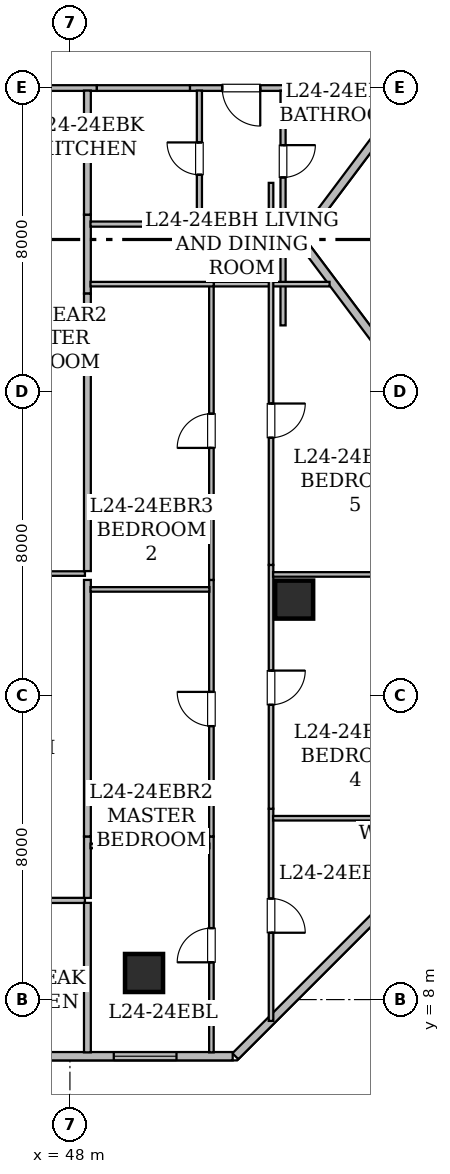
"""IFC4 building model, lengths in metres.
Left out: names, types, materials, properties, quantities, classifications, styles, units other than length and angle.
Written with IfcOpenShell. Run it as: python <this file> out.ifc"""

import sys

from ifc_helpers import new_model, si_unit, direction, frame, frame_2d, origin, origin_2d, place, context, subcontext, project, spatial, rectangle, hollow_rectangle, extrude, element, fill, save


model = new_model("IFC4")
c1 = context("Model", 3, precision=1e-05, world=origin(), true_north=direction((0.0, 1.0)))
c2 = subcontext(c1, "Body", "Model", "MODEL_VIEW")
j1 = project(units=[si_unit("LENGTHUNIT", "METRE"), si_unit("PLANEANGLEUNIT", "RADIAN")], contexts=[c1])
p1 = place(None, origin())
s1 = spatial("IfcSite", under=j1, at=p1, CompositionType="ELEMENT")
p2 = place(p1, origin())
s2 = spatial("IfcBuilding", under=s1, at=p2, CompositionType="ELEMENT")
p3 = place(p2, frame((0.0, 0.0, 98.25)))
s3 = spatial("IfcBuildingStorey", under=s2, at=p3, CompositionType="ELEMENT", Elevation=98.25)
for number, where, z_axis, x_axis in (
    (1, (49.95, 8.7, 0.0), (0.0, 0.0, 1.0), (1.0, 0.0, 0.0)),
    (2, (53.9, 18.525, 0.0), (0.0, 0.0, 1.0), (1.0, 0.0, 0.0)),
):
    element("IfcColumn", number, at=place(p3, frame(where, z_axis=z_axis, x_axis=x_axis)), inside=s3, PredefinedType="COLUMN", context=c2, shape_type="SweptSolid", body=[
        extrude(hollow_rectangle(XDim=1.0, YDim=1.0, WallThickness=0.05, at=origin_2d()), origin(), (0.0, 0.0, 1.0), 3.65),
    ])
p4 = place(p3, frame((56.456, 31.191, 0.0), z_axis=(0.0, 0.0, 1.0), x_axis=(-0.600137081448, -0.799897170561, 0.0)))
e3 = element("IfcWall", 3, at=p4, inside=s3, PredefinedType="STANDARD", context=c2, shape_type="SweptSolid", body=[
    extrude(rectangle(XDim=3.989, YDim=0.22, at=frame_2d((1.995, 0.0))), origin(), (0.0, 0.0, 1.0), 3.43),
])
p5 = place(p3, frame((54.119, 27.924, 0.0), z_axis=(0.0, 0.0, 1.0), x_axis=(0.600039540588, -0.799970343032, 0.0)))
e4 = element("IfcWall", 4, at=p5, inside=s3, PredefinedType="STANDARD", context=c2, shape_type="SweptSolid", body=[
    extrude(rectangle(XDim=3.952, YDim=0.22, at=frame_2d((1.976, 0.0))), origin(), (0.0, 0.0, 1.0), 3.43),
])
p6 = place(p3, frame((56.44, 10.596, 0.0), z_axis=(0.0, 0.0, 1.0), x_axis=(-0.707106781187, -0.707106781187, 0.0)))
e5 = element("IfcWall", 5, at=p6, inside=s3, PredefinedType="STANDARD", context=c2, shape_type="SweptSolid", body=[
    extrude(rectangle(XDim=5.778, YDim=0.22, at=frame_2d((2.889, 0.0))), origin(), (0.0, 0.0, 1.0), 3.43),
])
p7 = place(p3, frame((52.283, 6.51, 0.0), z_axis=(0.0, 0.0, 1.0), x_axis=(-1.0, 0.0, 0.0)))
e6 = element("IfcWall", 6, at=p7, inside=s3, PredefinedType="STANDARD", context=c2, shape_type="SweptSolid", body=[
    extrude(rectangle(XDim=38.568, YDim=0.22, at=frame_2d((19.284, 0.0))), origin(), (0.0, 0.0, 1.0), 3.43),
])
p8 = place(p7, frame((21.108, 0.0, 0.85)))
e7 = element("IfcOpeningElement", 7, at=p8, cuts=e6, PredefinedType="OPENING", context=c2, shape_type="SweptSolid", body=[
    extrude(rectangle(XDim=1.65, YDim=1.55, at=frame_2d((0.825, 0.775))), frame((0.0, 0.12, 0.0), z_axis=(0.0, -1.0, 0.0), x_axis=(1.0, 0.0, 0.0)), (0.0, 0.0, 1.0), 0.24),
])
p9 = place(p7, frame((35.355, 0.0, 0.85)))
e8 = element("IfcOpeningElement", 8, at=p9, cuts=e6, PredefinedType="OPENING", context=c2, shape_type="SweptSolid", body=[
    extrude(rectangle(XDim=1.65, YDim=1.55, at=frame_2d((0.825, 0.775))), frame((0.0, 0.12, 0.0), z_axis=(0.0, -1.0, 0.0), x_axis=(1.0, 0.0, 0.0)), (0.0, 0.0, 1.0), 0.24),
])
p10 = place(p7, frame((29.413, 0.0, 0.8)))
e9 = element("IfcOpeningElement", 9, at=p10, cuts=e6, PredefinedType="OPENING", context=c2, shape_type="SweptSolid", body=[
    extrude(rectangle(XDim=1.2, YDim=1.5, at=frame_2d((0.6, 0.75))), frame((0.0, 0.12, 0.0), z_axis=(0.0, -1.0, 0.0), x_axis=(1.0, 0.0, 0.0)), (0.0, 0.0, 1.0), 0.24),
])
p11 = place(p7, frame((31.863, 0.0, 0.85)))
e10 = element("IfcOpeningElement", 10, at=p11, cuts=e6, PredefinedType="OPENING", context=c2, shape_type="SweptSolid", body=[
    extrude(rectangle(XDim=1.65, YDim=1.55, at=frame_2d((0.825, 0.775))), frame((0.0, 0.12, 0.0), z_axis=(0.0, -1.0, 0.0), x_axis=(1.0, 0.0, 0.0)), (0.0, 0.0, 1.0), 0.24),
])
p12 = place(p7, frame((26.513, 0.0, 0.85)))
e11 = element("IfcOpeningElement", 11, at=p12, cuts=e6, PredefinedType="OPENING", context=c2, shape_type="SweptSolid", body=[
    extrude(rectangle(XDim=1.65, YDim=1.55, at=frame_2d((0.825, 0.775))), frame((0.0, 0.12, 0.0), z_axis=(0.0, -1.0, 0.0), x_axis=(1.0, 0.0, 0.0)), (0.0, 0.0, 1.0), 0.24),
])
p13 = place(p7, frame((13.843, 0.0, 0.85)))
e12 = element("IfcOpeningElement", 12, at=p13, cuts=e6, PredefinedType="OPENING", context=c2, shape_type="SweptSolid", body=[
    extrude(rectangle(XDim=1.65, YDim=1.55, at=frame_2d((0.825, 0.775))), frame((0.0, 0.12, 0.0), z_axis=(0.0, -1.0, 0.0), x_axis=(1.0, 0.0, 0.0)), (0.0, 0.0, 1.0), 0.24),
])
p14 = place(p7, frame((1.479, 0.0, 0.85)))
e13 = element("IfcOpeningElement", 13, at=p14, cuts=e6, PredefinedType="OPENING", context=c2, shape_type="SweptSolid", body=[
    extrude(rectangle(XDim=1.65, YDim=1.55, at=frame_2d((0.825, 0.775))), frame((0.0, 0.12, 0.0), z_axis=(0.0, -1.0, 0.0), x_axis=(1.0, 0.0, 0.0)), (0.0, 0.0, 1.0), 0.24),
])
p15 = place(p3, frame((48.709, 31.985, 0.0), z_axis=(0.0, 0.0, 1.0), x_axis=(-1.0, 0.0, 0.0)))
e14 = element("IfcWall", 14, at=p15, inside=s3, PredefinedType="STANDARD", context=c2, shape_type="SweptSolid", body=[
    extrude(rectangle(XDim=3.906, YDim=0.15, at=frame_2d((1.953, 0.0))), origin(), (0.0, 0.0, 1.0), 2.647),
])
p16 = place(p3, frame((53.857, 31.985, 0.0), z_axis=(0.0, 0.0, 1.0), x_axis=(-1.0, 0.0, 0.0)))
e15 = element("IfcWall", 15, at=p16, inside=s3, PredefinedType="STANDARD", context=c2, shape_type="SweptSolid", body=[
    extrude(rectangle(XDim=2.699, YDim=0.15, at=frame_2d((1.35, 0.0))), origin(), (0.0, 0.0, 1.0), 2.876),
])
p17 = place(p16, frame((0.849, 0.0, 0.0)))
e16 = element("IfcOpeningElement", 16, at=p17, cuts=e15, PredefinedType="OPENING", context=c2, shape_type="SweptSolid", body=[
    extrude(rectangle(XDim=1.0, YDim=2.15, at=frame_2d((0.5, 1.075))), frame((0.0, 0.085, 0.0), z_axis=(0.0, -1.0, 0.0), x_axis=(1.0, 0.0, 0.0)), (0.0, 0.0, 1.0), 0.17),
])
p18 = place(p3, frame((56.388, 31.985, 0.0), z_axis=(0.0, 0.0, 1.0), x_axis=(-1.0, 0.0, 0.0)))
e17 = element("IfcWall", 17, at=p18, inside=s3, PredefinedType="STANDARD", context=c2, shape_type="SweptSolid", body=[
    extrude(rectangle(XDim=2.531, YDim=0.15, at=frame_2d((1.266, 0.0))), origin(), (0.0, 0.0, 1.0), 2.876),
])
p19 = place(p3, frame((51.158, 31.985, 0.0), z_axis=(0.0, 0.0, 1.0), x_axis=(-1.0, 0.0, 0.0)))
e18 = element("IfcWall", 18, at=p19, inside=s3, PredefinedType="STANDARD", context=c2, shape_type="SweptSolid", body=[
    extrude(rectangle(XDim=2.449, YDim=0.15, at=frame_2d((1.225, 0.0))), origin(), (0.0, 0.0, 1.0), 3.43),
])
p20 = place(p3, frame((44.803, 19.21, 0.0), z_axis=(0.0, 0.0, 1.0), x_axis=(1.0, 0.0, 0.0)))
e19 = element("IfcWall", 19, at=p20, inside=s3, PredefinedType="PARTITIONING", context=c2, shape_type="SweptSolid", body=[
    extrude(rectangle(XDim=3.592, YDim=0.12, at=frame_2d((1.796, 0.0))), origin(), (0.0, 0.0, 1.0), 2.647),
])
p21 = place(p20, frame((0.397, 0.0, 0.0)))
e20 = element("IfcOpeningElement", 20, at=p21, cuts=e19, PredefinedType="OPENING", context=c2, shape_type="SweptSolid", body=[
    extrude(rectangle(XDim=0.9, YDim=2.1, at=frame_2d((0.45, 1.05))), frame((0.0, 0.07, 0.0), z_axis=(0.0, -1.0, 0.0), x_axis=(1.0, 0.0, 0.0)), (0.0, 0.0, 1.0), 0.14),
])
p22 = place(p3, frame((48.395, 10.61, 0.0), z_axis=(0.0, 0.0, 1.0), x_axis=(-1.0, 0.0, 0.0)))
e21 = element("IfcWall", 21, at=p22, inside=s3, PredefinedType="PARTITIONING", context=c2, shape_type="SweptSolid", body=[
    extrude(rectangle(XDim=4.166, YDim=0.135, at=frame_2d((2.083, 0.0))), origin(), (0.0, 0.0, 1.0), 3.43),
])
p23 = place(p22, frame((1.658, 0.0, 0.0)))
e22 = element("IfcOpeningElement", 22, at=p23, cuts=e21, PredefinedType="OPENING", context=c2, shape_type="SweptSolid", body=[
    extrude(rectangle(XDim=0.85, YDim=2.1, at=frame_2d((0.425, 1.05))), frame((0.0, 0.077, 0.0), z_axis=(0.0, -1.0, 0.0), x_axis=(1.0, 0.0, 0.0)), (0.0, 0.0, 1.0), 0.155),
])
p24 = place(p3, frame((48.46, 12.292, 0.0), z_axis=(0.0, 0.0, 1.0), x_axis=(0.0, -1.0, 0.0)))
e23 = element("IfcWall", 23, at=p24, inside=s3, PredefinedType="STANDARD", context=c2, shape_type="SweptSolid", body=[
    extrude(rectangle(XDim=1.617, YDim=0.18, at=frame_2d((0.809, 0.0))), origin(), (0.0, 0.0, 1.0), 2.647),
])
p25 = place(p3, frame((48.46, 19.042, 0.0), z_axis=(0.0, 0.0, 1.0), x_axis=(0.0, -1.0, 0.0)))
e24 = element("IfcWall", 24, at=p25, inside=s3, PredefinedType="STANDARD", context=c2, shape_type="SweptSolid", body=[
    extrude(rectangle(XDim=6.75, YDim=0.18, at=frame_2d((3.375, 0.0))), origin(), (0.0, 0.0, 1.0), 2.647),
])
p26 = place(p3, frame((48.46, 28.654, 0.0), z_axis=(0.0, 0.0, 1.0), x_axis=(0.0, -1.0, 0.0)))
e25 = element("IfcWall", 25, at=p26, inside=s3, PredefinedType="STANDARD", context=c2, shape_type="SweptSolid", body=[
    extrude(rectangle(XDim=2.078, YDim=0.18, at=frame_2d((1.039, 0.0))), origin(), (0.0, 0.0, 1.0), 3.43),
])
p27 = place(p3, frame((48.46, 31.918, 0.0), z_axis=(0.0, 0.0, 1.0), x_axis=(0.0, -1.0, 0.0)))
e26 = element("IfcWall", 26, at=p27, inside=s3, PredefinedType="STANDARD", context=c2, shape_type="SweptSolid", body=[
    extrude(rectangle(XDim=3.264, YDim=0.18, at=frame_2d((1.632, 0.0))), origin(), (0.0, 0.0, 1.0), 3.43),
])
p28 = place(p3, frame((48.46, 26.576, 0.0), z_axis=(0.0, 0.0, 1.0), x_axis=(0.0, -1.0, 0.0)))
e27 = element("IfcWall", 27, at=p28, inside=s3, PredefinedType="STANDARD", context=c2, shape_type="SweptSolid", body=[
    extrude(rectangle(XDim=7.301, YDim=0.18, at=frame_2d((3.65, 0.0))), origin(), (0.0, 0.0, 1.0), 2.687),
])
p29 = place(p3, frame((48.46, 10.545, 0.0), z_axis=(0.0, 0.0, 1.0), x_axis=(0.0, -1.0, 0.0)))
e28 = element("IfcWall", 28, at=p29, inside=s3, PredefinedType="STANDARD", context=c2, shape_type="SweptSolid", body=[
    extrude(rectangle(XDim=3.933, YDim=0.18, at=frame_2d((1.966, 0.0))), origin(), (0.0, 0.0, 1.0), 2.876),
])
p30 = place(p3, frame((53.608, 31.918, 0.0), z_axis=(0.0, 0.0, 1.0), x_axis=(0.0, -1.0, 0.0)))
e29 = element("IfcWall", 29, at=p30, inside=s3, PredefinedType="PARTITIONING", context=c2, shape_type="SweptSolid", body=[
    extrude(rectangle(XDim=6.178, YDim=0.135, at=frame_2d((3.089, 0.0))), origin(), (0.0, 0.0, 1.0), 2.876),
])
p31 = place(p30, frame((1.435, 0.0, 0.0)))
e30 = element("IfcOpeningElement", 30, at=p31, cuts=e29, PredefinedType="OPENING", context=c2, shape_type="SweptSolid", body=[
    extrude(rectangle(XDim=0.85, YDim=2.1, at=frame_2d((0.425, 1.05))), frame((0.0, 0.077, 0.0), z_axis=(0.0, -1.0, 0.0), x_axis=(1.0, 0.0, 0.0)), (0.0, 0.0, 1.0), 0.155),
])
p32 = place(p3, frame((50.943, 28.405, 0.0), z_axis=(0.0, 0.0, 1.0), x_axis=(1.0, 0.0, 0.0)))
e31 = element("IfcWall", 31, at=p32, inside=s3, PredefinedType="PARTITIONING", context=c2, shape_type="SweptSolid", body=[
    extrude(rectangle(XDim=3.311, YDim=0.135, at=frame_2d((1.655, 0.0))), origin(), (0.0, 0.0, 1.0), 2.876),
])
p33 = place(p3, frame((48.542, 28.405, 0.0), z_axis=(0.0, 0.0, 1.0), x_axis=(1.0, 0.0, 0.0)))
e32 = element("IfcWall", 32, at=p33, inside=s3, PredefinedType="PARTITIONING", context=c2, shape_type="SweptSolid", body=[
    extrude(rectangle(XDim=2.401, YDim=0.135, at=frame_2d((1.201, 0.0))), origin(), (0.0, 0.0, 1.0), 3.43),
])
p34 = place(p3, frame((51.407, 28.34, 0.0), z_axis=(0.0, 0.0, 1.0), x_axis=(0.0, 1.0, 0.0)))
e33 = element("IfcWall", 33, at=p34, inside=s3, PredefinedType="PARTITIONING", context=c2, shape_type="SweptSolid", body=[
    extrude(rectangle(XDim=3.578, YDim=0.135, at=frame_2d((1.789, 0.0))), origin(), (0.0, 0.0, 1.0), 3.43),
])
p35 = place(p34, frame((1.364, 0.0, 0.0)))
e34 = element("IfcOpeningElement", 34, at=p35, cuts=e33, PredefinedType="OPENING", context=c2, shape_type="SweptSolid", body=[
    extrude(rectangle(XDim=0.85, YDim=2.1, at=frame_2d((0.425, 1.05))), frame((0.0, 0.077, 0.0), z_axis=(0.0, -1.0, 0.0), x_axis=(1.0, 0.0, 0.0)), (0.0, 0.0, 1.0), 0.155),
])
p36 = place(p3, frame((51.723, 6.612, 0.0), z_axis=(0.0, 0.0, 1.0), x_axis=(0.0, 1.0, 0.0)))
e35 = element("IfcWall", 35, at=p36, inside=s3, PredefinedType="PARTITIONING", context=c2, shape_type="SweptSolid", body=[
    extrude(rectangle(XDim=5.68, YDim=0.12, at=frame_2d((2.84, 0.0))), origin(), (0.0, 0.0, 1.0), 3.43),
])
p37 = place(p36, frame((2.369, 0.0, 0.0)))
e36 = element("IfcOpeningElement", 36, at=p37, cuts=e35, PredefinedType="OPENING", context=c2, shape_type="SweptSolid", body=[
    extrude(rectangle(XDim=0.9, YDim=2.1, at=frame_2d((0.45, 1.05))), frame((0.0, 0.07, 0.0), z_axis=(0.0, -1.0, 0.0), x_axis=(1.0, 0.0, 0.0)), (0.0, 0.0, 1.0), 0.14),
])
p38 = place(p3, frame((51.723, 12.292, 0.0), z_axis=(0.0, 0.0, 1.0), x_axis=(0.0, 1.0, 0.0)))
e37 = element("IfcWall", 37, at=p38, inside=s3, PredefinedType="PARTITIONING", context=c2, shape_type="SweptSolid", body=[
    extrude(rectangle(XDim=6.75, YDim=0.12, at=frame_2d((3.375, 0.0))), origin(), (0.0, 0.0, 1.0), 2.687),
])
p39 = place(p38, frame((2.904, 0.0, 0.0)))
e38 = element("IfcOpeningElement", 38, at=p39, cuts=e37, PredefinedType="OPENING", context=c2, shape_type="SweptSolid", body=[
    extrude(rectangle(XDim=0.9, YDim=2.1, at=frame_2d((0.45, 1.05))), frame((0.0, 0.07, 0.0), z_axis=(0.0, -1.0, 0.0), x_axis=(1.0, 0.0, 0.0)), (0.0, 0.0, 1.0), 0.14),
])
p40 = place(p3, frame((51.723, 19.042, 0.0), z_axis=(0.0, 0.0, 1.0), x_axis=(0.0, 1.0, 0.0)))
e39 = element("IfcWall", 39, at=p40, inside=s3, PredefinedType="PARTITIONING", context=c2, shape_type="SweptSolid", body=[
    extrude(rectangle(XDim=7.848, YDim=0.12, at=frame_2d((3.924, 0.0))), origin(), (0.0, 0.0, 1.0), 2.687),
])
p41 = place(p40, frame((3.474, 0.0, 0.0)))
e40 = element("IfcOpeningElement", 40, at=p41, cuts=e39, PredefinedType="OPENING", context=c2, shape_type="SweptSolid", body=[
    extrude(rectangle(XDim=0.9, YDim=2.1, at=frame_2d((0.45, 1.05))), frame((0.0, 0.07, 0.0), z_axis=(0.0, -1.0, 0.0), x_axis=(1.0, 0.0, 0.0)), (0.0, 0.0, 1.0), 0.14),
])
p42 = place(p3, frame((51.788, 26.825, 0.0), z_axis=(0.0, 0.0, 1.0), x_axis=(-1.0, 0.0, 0.0)))
e41 = element("IfcWall", 41, at=p42, inside=s3, PredefinedType="PARTITIONING", context=c2, shape_type="SweptSolid", body=[
    extrude(rectangle(XDim=3.246, YDim=0.12, at=frame_2d((1.623, 0.0))), origin(), (0.0, 0.0, 1.0), 3.43),
])
p43 = place(p3, frame((53.292, 13.021, 0.0), z_axis=(0.0, 0.0, 1.0), x_axis=(0.0, -1.0, 0.0)))
e42 = element("IfcWall", 42, at=p43, inside=s3, PredefinedType="PARTITIONING", context=c2, shape_type="SweptSolid", body=[
    extrude(rectangle(XDim=5.582, YDim=0.12, at=frame_2d((2.791, 0.0))), origin(), (0.0, 0.0, 1.0), 3.43),
])
p44 = place(p43, frame((2.362, 0.0, 0.0)))
e43 = element("IfcOpeningElement", 43, at=p44, cuts=e42, PredefinedType="OPENING", context=c2, shape_type="SweptSolid", body=[
    extrude(rectangle(XDim=0.9, YDim=2.1, at=frame_2d((0.45, 1.05))), frame((0.0, 0.07, 0.0), z_axis=(0.0, -1.0, 0.0), x_axis=(1.0, 0.0, 0.0)), (0.0, 0.0, 1.0), 0.14),
])
p45 = place(p3, frame((53.292, 19.437, 0.0), z_axis=(0.0, 0.0, 1.0), x_axis=(0.0, -1.0, 0.0)))
e44 = element("IfcWall", 44, at=p45, inside=s3, PredefinedType="PARTITIONING", context=c2, shape_type="SweptSolid", body=[
    extrude(rectangle(XDim=6.416, YDim=0.12, at=frame_2d((3.208, 0.0))), origin(), (0.0, 0.0, 1.0), 2.687),
])
p46 = place(p45, frame((2.78, 0.0, 0.0)))
e45 = element("IfcOpeningElement", 45, at=p46, cuts=e44, PredefinedType="OPENING", context=c2, shape_type="SweptSolid", body=[
    extrude(rectangle(XDim=0.9, YDim=2.1, at=frame_2d((0.45, 1.05))), frame((0.0, 0.07, 0.0), z_axis=(0.0, -1.0, 0.0), x_axis=(1.0, 0.0, 0.0)), (0.0, 0.0, 1.0), 0.14),
])
p47 = place(p3, frame((54.832, 26.825, 0.0), z_axis=(0.0, 0.0, 1.0), x_axis=(-1.0, 0.0, 0.0)))
e46 = element("IfcWall", 46, at=p47, inside=s3, PredefinedType="PARTITIONING", context=c2, shape_type="SweptSolid", body=[
    extrude(rectangle(XDim=3.044, YDim=0.12, at=frame_2d((1.522, 0.0))), origin(), (0.0, 0.0, 1.0), 2.876),
])
p48 = place(p3, frame((53.292, 29.49, 0.0), z_axis=(0.0, 0.0, 1.0), x_axis=(0.0, -1.0, 0.0)))
e47 = element("IfcWall", 47, at=p48, inside=s3, PredefinedType="PARTITIONING", context=c2, shape_type="SweptSolid", body=[
    extrude(rectangle(XDim=10.053, YDim=0.12, at=frame_2d((5.026, 0.0))), origin(), (0.0, 0.0, 1.0), 2.687),
])
p49 = place(p48, frame((5.806, 0.0, 0.0)))
e48 = element("IfcOpeningElement", 48, at=p49, cuts=e47, PredefinedType="OPENING", context=c2, shape_type="SweptSolid", body=[
    extrude(rectangle(XDim=0.9, YDim=2.1, at=frame_2d((0.45, 1.05))), frame((0.0, 0.07, 0.0), z_axis=(0.0, -1.0, 0.0), x_axis=(1.0, 0.0, 0.0)), (0.0, 0.0, 1.0), 0.14),
])
p50 = place(p3, frame((48.542, 12.043, 0.0), z_axis=(0.0, 0.0, 1.0), x_axis=(1.0, 0.0, 0.0)))
e49 = element("IfcWall", 49, at=p50, inside=s3, PredefinedType="PARTITIONING", context=c2, shape_type="SweptSolid", body=[
    extrude(rectangle(XDim=3.127, YDim=0.12, at=frame_2d((1.563, 0.0))), origin(), (0.0, 0.0, 1.0), 2.647),
])
p51 = place(p3, frame((48.542, 18.793, 0.0), z_axis=(0.0, 0.0, 1.0), x_axis=(1.0, 0.0, 0.0)))
e50 = element("IfcWall", 50, at=p51, inside=s3, PredefinedType="PARTITIONING", context=c2, shape_type="SweptSolid", body=[
    extrude(rectangle(XDim=3.127, YDim=0.12, at=frame_2d((1.563, 0.0))), origin(), (0.0, 0.0, 1.0), 2.687),
])
p52 = place(p3, frame((53.346, 12.772, 0.0), z_axis=(0.0, 0.0, 1.0), x_axis=(1.0, 0.0, 0.0)))
e51 = element("IfcWall", 51, at=p52, inside=s3, PredefinedType="PARTITIONING", context=c2, shape_type="SweptSolid", body=[
    extrude(rectangle(XDim=3.042, YDim=0.12, at=frame_2d((1.521, 0.0))), origin(), (0.0, 0.0, 1.0), 3.43),
])
p53 = place(p3, frame((53.346, 19.187, 0.0), z_axis=(0.0, 0.0, 1.0), x_axis=(1.0, 0.0, 0.0)))
e52 = element("IfcWall", 52, at=p53, inside=s3, PredefinedType="PARTITIONING", context=c2, shape_type="SweptSolid", body=[
    extrude(rectangle(XDim=3.042, YDim=0.12, at=frame_2d((1.521, 0.0))), origin(), (0.0, 0.0, 1.0), 2.876),
])
p54 = place(p14, origin())
e53 = element("IfcWindow", 53, at=p54, inside=s3, PartitioningType="SINGLE_PANEL", PredefinedType="WINDOW", context=c2, shape_type="SweptSolid", body=[
    extrude(rectangle(XDim=1.65, YDim=1.55, at=frame_2d((0.825, 0.775))), frame((0.0, 0.03, 0.0), z_axis=(0.0, -1.0, 0.0), x_axis=(1.0, 0.0, 0.0)), (0.0, 0.0, 1.0), 0.06),
])
fill(e13, e53)
p55 = place(p17, origin())
e54 = element("IfcDoor", 54, at=p55, inside=s3, OperationType="SINGLE_SWING_LEFT", PredefinedType="DOOR", context=c2, shape_type="SweptSolid", body=[
    extrude(rectangle(XDim=1.0, YDim=2.15, at=frame_2d((0.5, 1.075))), frame((0.0, 0.025, 0.0), z_axis=(0.0, -1.0, 0.0), x_axis=(1.0, 0.0, 0.0)), (0.0, 0.0, 1.0), 0.05),
])
fill(e16, e54)
p56 = place(p31, origin())
e55 = element("IfcDoor", 55, at=p56, inside=s3, OperationType="SINGLE_SWING_LEFT", PredefinedType="DOOR", context=c2, shape_type="SweptSolid", body=[
    extrude(rectangle(XDim=0.85, YDim=2.1, at=frame_2d((0.425, 1.05))), frame((0.0, 0.025, 0.0), z_axis=(0.0, -1.0, 0.0), x_axis=(1.0, 0.0, 0.0)), (0.0, 0.0, 1.0), 0.05),
])
fill(e30, e55)
p57 = place(p35, origin())
e56 = element("IfcDoor", 56, at=p57, inside=s3, OperationType="SINGLE_SWING_RIGHT", PredefinedType="DOOR", context=c2, shape_type="SweptSolid", body=[
    extrude(rectangle(XDim=0.85, YDim=2.1, at=frame_2d((0.425, 1.05))), frame((0.0, 0.025, 0.0), z_axis=(0.0, -1.0, 0.0), x_axis=(1.0, 0.0, 0.0)), (0.0, 0.0, 1.0), 0.05),
])
fill(e34, e56)
p58 = place(p37, origin())
e57 = element("IfcDoor", 57, at=p58, inside=s3, OperationType="SINGLE_SWING_LEFT", PredefinedType="DOOR", context=c2, shape_type="SweptSolid", body=[
    extrude(rectangle(XDim=0.9, YDim=2.1, at=frame_2d((0.45, 1.05))), frame((0.0, 0.025, 0.0), z_axis=(0.0, -1.0, 0.0), x_axis=(1.0, 0.0, 0.0)), (0.0, 0.0, 1.0), 0.05),
])
fill(e36, e57)
p59 = place(p39, origin())
e58 = element("IfcDoor", 58, at=p59, inside=s3, OperationType="SINGLE_SWING_RIGHT", PredefinedType="DOOR", context=c2, shape_type="SweptSolid", body=[
    extrude(rectangle(XDim=0.9, YDim=2.1, at=frame_2d((0.45, 1.05))), frame((0.0, 0.025, 0.0), z_axis=(0.0, -1.0, 0.0), x_axis=(1.0, 0.0, 0.0)), (0.0, 0.0, 1.0), 0.05),
])
fill(e38, e58)
p60 = place(p41, origin())
e59 = element("IfcDoor", 59, at=p60, inside=s3, OperationType="SINGLE_SWING_LEFT", PredefinedType="DOOR", context=c2, shape_type="SweptSolid", body=[
    extrude(rectangle(XDim=0.9, YDim=2.1, at=frame_2d((0.45, 1.05))), frame((0.0, 0.025, 0.0), z_axis=(0.0, -1.0, 0.0), x_axis=(1.0, 0.0, 0.0)), (0.0, 0.0, 1.0), 0.05),
])
fill(e40, e59)
p61 = place(p44, origin())
e60 = element("IfcDoor", 60, at=p61, inside=s3, OperationType="SINGLE_SWING_RIGHT", PredefinedType="DOOR", context=c2, shape_type="SweptSolid", body=[
    extrude(rectangle(XDim=0.9, YDim=2.1, at=frame_2d((0.45, 1.05))), frame((0.0, 0.025, 0.0), z_axis=(0.0, -1.0, 0.0), x_axis=(1.0, 0.0, 0.0)), (0.0, 0.0, 1.0), 0.05),
])
fill(e43, e60)
p62 = place(p46, origin())
e61 = element("IfcDoor", 61, at=p62, inside=s3, OperationType="SINGLE_SWING_LEFT", PredefinedType="DOOR", context=c2, shape_type="SweptSolid", body=[
    extrude(rectangle(XDim=0.9, YDim=2.1, at=frame_2d((0.45, 1.05))), frame((0.0, 0.025, 0.0), z_axis=(0.0, -1.0, 0.0), x_axis=(1.0, 0.0, 0.0)), (0.0, 0.0, 1.0), 0.05),
])
fill(e45, e61)
p63 = place(p49, origin())
e62 = element("IfcDoor", 62, at=p63, inside=s3, OperationType="SINGLE_SWING_LEFT", PredefinedType="DOOR", context=c2, shape_type="SweptSolid", body=[
    extrude(rectangle(XDim=0.9, YDim=2.1, at=frame_2d((0.45, 1.05))), frame((0.0, 0.025, 0.0), z_axis=(0.0, -1.0, 0.0), x_axis=(1.0, 0.0, 0.0)), (0.0, 0.0, 1.0), 0.05),
])
fill(e48, e62)
save(model, sys.argv[1])
